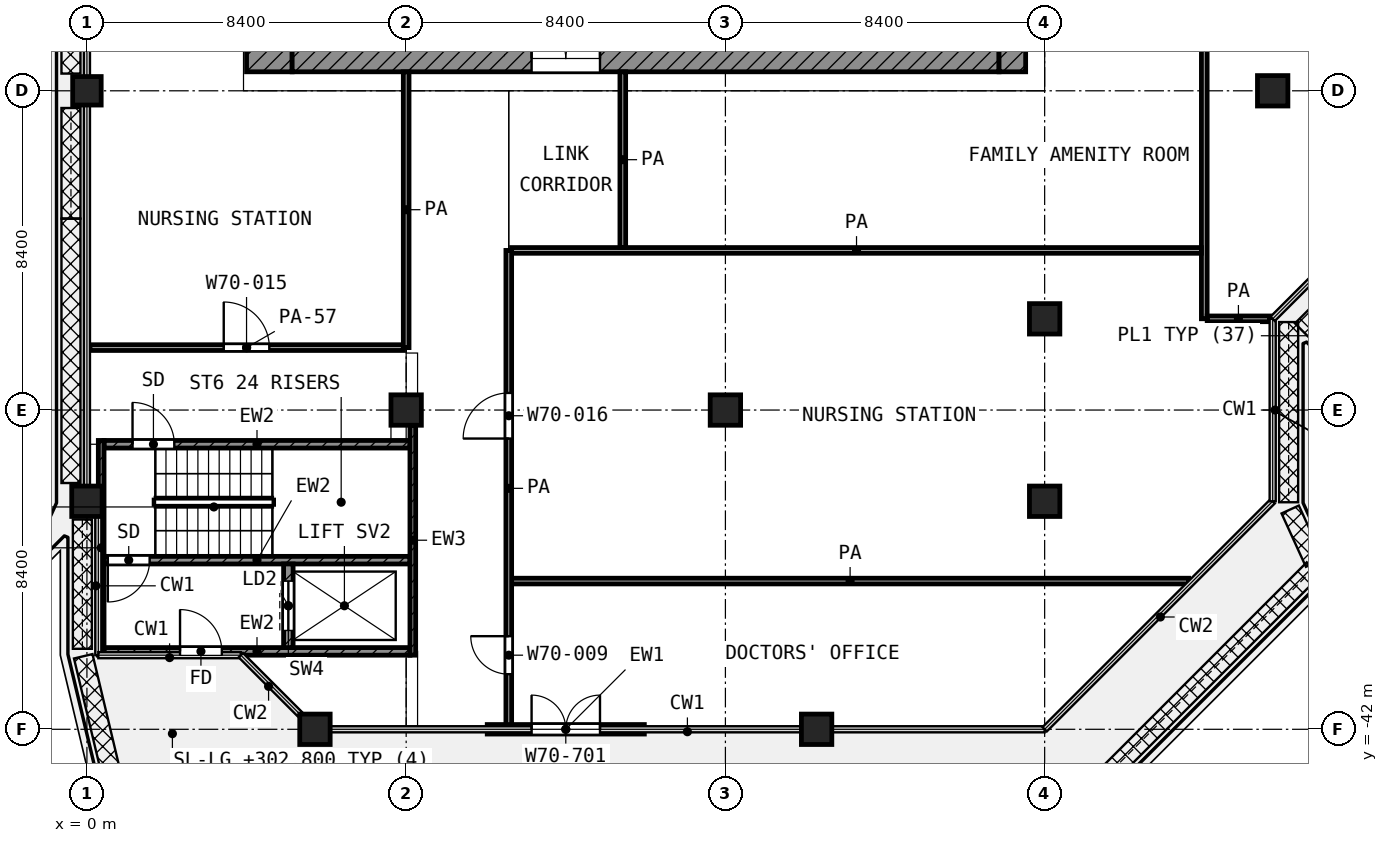
"""IFC4 building model, lengths in metres.
Left out: names, types, materials, properties, quantities, classifications, styles, units other than length and angle.
Written with IfcOpenShell. Run it as: python <this file> out.ifc"""

import sys

from ifc_helpers import new_model, si_unit, direction, frame, frame_2d, origin, origin_2d, place, context, subcontext, project, spatial, rectangle, extrude, element, fill, save


model = new_model("IFC4")
c1 = context("Model", 3, precision=1e-05, world=origin(), true_north=direction((0.0, 1.0)))
c2 = subcontext(c1, "Body", "Model", "MODEL_VIEW")
j1 = project(units=[si_unit("LENGTHUNIT", "METRE"), si_unit("PLANEANGLEUNIT", "RADIAN")], contexts=[c1])
p1 = place(None, origin())
s1 = spatial("IfcSite", under=j1, at=p1, CompositionType="ELEMENT")
p2 = place(p1, origin())
s2 = spatial("IfcBuilding", under=s1, at=p2, CompositionType="ELEMENT")
p3 = place(p2, frame((0.0, 0.0, 302.8)))
s3 = spatial("IfcBuildingStorey", under=s2, at=p3, CompositionType="ELEMENT", Elevation=302.8)
p4 = place(p3, frame((0.0, -25.2, 0.0), z_axis=(0.0, 0.0, 1.0), x_axis=(1.0, 0.0, 0.0)))
e1 = element("IfcColumn", 1, at=p4, inside=s3, PredefinedType="COLUMN", context=c2, shape_type="SweptSolid", body=[
    extrude(rectangle(XDim=0.75, YDim=0.75, at=origin_2d()), origin(), (0.0, 0.0, 1.0), 4.2),
])
for number, where, z_axis, x_axis in (
    (2, (31.2, -25.2, 0.0), (0.0, 0.0, 1.0), (1.0, 0.0, 0.0)),
    (3, (25.2, -31.2, 0.0), (0.0, 0.0, 1.0), (1.0, 0.0, 0.0)),
    (4, (8.4, -33.6, 0.0), (0.0, 0.0, 1.0), (1.0, 0.0, 0.0)),
    (5, (16.8, -33.6, 0.0), (0.0, 0.0, 1.0), (1.0, 0.0, 0.0)),
    (6, (0.0, -36.0, 0.0), (0.0, 0.0, 1.0), (1.0, 0.0, 0.0)),
    (7, (25.2, -36.0, 0.0), (0.0, 0.0, 1.0), (1.0, 0.0, 0.0)),
    (8, (6.0, -42.0, 0.0), (0.0, 0.0, 1.0), (1.0, 0.0, 0.0)),
    (9, (19.2, -42.0, 0.0), (0.0, 0.0, 1.0), (1.0, 0.0, 0.0)),
):
    element("IfcColumn", number, at=place(p3, frame(where, z_axis=z_axis, x_axis=x_axis)), inside=s3, PredefinedType="COLUMN", context=c2, shape_type="SweptSolid", body=[
        extrude(rectangle(XDim=0.8, YDim=0.8, at=origin_2d()), origin(), (0.0, 0.0, 1.0), 4.2),
    ])
p5 = place(p3, frame((10.533, -42.0, 0.0), z_axis=(0.0, 0.0, 1.0), x_axis=(1.0, 0.0, 0.0)))
e10 = element("IfcWall", 10, at=p5, inside=s3, PredefinedType="SOLIDWALL", context=c2, shape_type="SweptSolid", body=[
    extrude(rectangle(XDim=4.133, YDim=0.25, at=frame_2d((2.067, 0.0))), origin(), (0.0, 0.0, 1.0), 3.48),
])
p6 = place(p5, frame((1.167, 0.0, 0.0)))
e11 = element("IfcOpeningElement", 11, at=p6, cuts=e10, PredefinedType="OPENING", context=c2, shape_type="SweptSolid", body=[
    extrude(rectangle(XDim=1.8, YDim=2.1, at=frame_2d((0.9, 1.05))), frame((0.0, 0.135, 0.0), z_axis=(0.0, -1.0, 0.0), x_axis=(1.0, 0.0, 0.0)), (0.0, 0.0, 1.0), 0.27),
])
p7 = place(p3, frame((4.8, -24.7, 0.0), z_axis=(0.0, 0.0, 1.0), x_axis=(0.0, 1.0, 0.0)))
e12 = element("IfcWall", 12, at=p7, inside=s3, PredefinedType="SHEAR", context=c2, shape_type="SweptSolid", body=[
    extrude(rectangle(XDim=19.3, YDim=1.2, at=frame_2d((9.65, 0.0))), origin(), (0.0, 0.0, 1.0), 3.6),
])
p8 = place(p7, frame((11.15, 0.0, 0.0)))
e13 = element("IfcOpeningElement", 13, at=p8, cuts=e12, PredefinedType="OPENING", context=c2, shape_type="SweptSolid", body=[
    extrude(rectangle(XDim=1.1, YDim=2.1, at=frame_2d((0.55, 1.05))), frame((0.0, 0.61, 0.0), z_axis=(0.0, -1.0, 0.0), x_axis=(1.0, 0.0, 0.0)), (0.0, 0.0, 1.0), 1.22),
])
p9 = place(p7, frame((1.85, 0.0, 0.0)))
e14 = element("IfcOpeningElement", 14, at=p9, cuts=e12, PredefinedType="OPENING", context=c2, shape_type="SweptSolid", body=[
    extrude(rectangle(XDim=1.1, YDim=2.1, at=frame_2d((0.55, 1.05))), frame((0.0, 0.61, 0.0), z_axis=(0.0, -1.0, 0.0), x_axis=(1.0, 0.0, 0.0)), (0.0, 0.0, 1.0), 1.22),
])
p10 = place(p3, frame((5.4, -24.35, 0.0), z_axis=(0.0, 0.0, 1.0), x_axis=(1.0, 0.0, 0.0)))
e15 = element("IfcWall", 15, at=p10, inside=s3, PredefinedType="SHEAR", context=c2, shape_type="SweptSolid", body=[
    extrude(rectangle(XDim=18.6, YDim=0.7, at=frame_2d((9.3, 0.0))), origin(), (0.0, 0.0, 1.0), 3.6),
])
p11 = place(p10, frame((6.3, 0.0, 0.0)))
e16 = element("IfcOpeningElement", 16, at=p11, cuts=e15, PredefinedType="OPENING", context=c2, shape_type="SweptSolid", body=[
    extrude(rectangle(XDim=1.8, YDim=2.1, at=frame_2d((0.9, 1.05))), frame((0.0, 0.36, 0.0), z_axis=(0.0, -1.0, 0.0), x_axis=(1.0, 0.0, 0.0)), (0.0, 0.0, 1.0), 0.72),
])
p12 = place(p3, frame((24.35, -24.7, 0.0), z_axis=(0.0, 0.0, 1.0), x_axis=(0.0, 1.0, 0.0)))
e17 = element("IfcWall", 17, at=p12, inside=s3, PredefinedType="SHEAR", context=c2, shape_type="SweptSolid", body=[
    extrude(rectangle(XDim=0.7, YDim=0.7, at=frame_2d((0.35, 0.0))), origin(), (0.0, 0.0, 1.0), 3.6),
])
p13 = place(p3, frame((0.375, -40.05, 0.0), z_axis=(0.0, 0.0, 1.0), x_axis=(0.0, 1.0, 0.0)))
e18 = element("IfcWall", 18, at=p13, inside=s3, PredefinedType="SHEAR", context=c2, shape_type="SweptSolid", body=[
    extrude(rectangle(XDim=5.65, YDim=0.15, at=frame_2d((2.825, 0.0))), origin(), (0.0, 0.0, 1.0), 3.6),
])
p14 = place(p3, frame((8.575, -40.05, 0.0), z_axis=(0.0, 0.0, 1.0), x_axis=(0.0, 1.0, 0.0)))
e19 = element("IfcWall", 19, at=p14, inside=s3, PredefinedType="SHEAR", context=c2, shape_type="SweptSolid", body=[
    extrude(rectangle(XDim=6.05, YDim=0.15, at=frame_2d((3.025, 0.0))), origin(), (0.0, 0.0, 1.0), 3.6),
])
p15 = place(p3, frame((0.45, -34.5, 0.0), z_axis=(0.0, 0.0, 1.0), x_axis=(1.0, 0.0, 0.0)))
e20 = element("IfcWall", 20, at=p15, inside=s3, PredefinedType="SHEAR", context=c2, shape_type="SweptSolid", body=[
    extrude(rectangle(XDim=8.05, YDim=0.2, at=frame_2d((4.025, 0.0))), origin(), (0.0, 0.0, 1.0), 3.6),
])
p16 = place(p15, frame((0.75, 0.0, 0.0)))
e21 = element("IfcOpeningElement", 21, at=p16, cuts=e20, PredefinedType="OPENING", context=c2, shape_type="SweptSolid", body=[
    extrude(rectangle(XDim=1.1, YDim=2.1, at=frame_2d((0.55, 1.05))), frame((0.0, 0.11, 0.0), z_axis=(0.0, -1.0, 0.0), x_axis=(1.0, 0.0, 0.0)), (0.0, 0.0, 1.0), 0.22),
])
p17 = place(p3, frame((0.45, -37.55, 0.0), z_axis=(0.0, 0.0, 1.0), x_axis=(1.0, 0.0, 0.0)))
e22 = element("IfcWall", 22, at=p17, inside=s3, PredefinedType="SHEAR", context=c2, shape_type="SweptSolid", body=[
    extrude(rectangle(XDim=8.05, YDim=0.2, at=frame_2d((4.025, 0.0))), origin(), (0.0, 0.0, 1.0), 3.6),
])
p18 = place(p17, frame((0.1, 0.0, 0.0)))
e23 = element("IfcOpeningElement", 23, at=p18, cuts=e22, PredefinedType="OPENING", context=c2, shape_type="SweptSolid", body=[
    extrude(rectangle(XDim=1.1, YDim=2.1, at=frame_2d((0.55, 1.05))), frame((0.0, 0.11, 0.0), z_axis=(0.0, -1.0, 0.0), x_axis=(1.0, 0.0, 0.0)), (0.0, 0.0, 1.0), 0.22),
])
p19 = place(p3, frame((0.45, -39.95, 0.0), z_axis=(0.0, 0.0, 1.0), x_axis=(1.0, 0.0, 0.0)))
e24 = element("IfcWall", 24, at=p19, inside=s3, PredefinedType="SHEAR", context=c2, shape_type="SweptSolid", body=[
    extrude(rectangle(XDim=8.05, YDim=0.2, at=frame_2d((4.025, 0.0))), origin(), (0.0, 0.0, 1.0), 3.6),
])
p20 = place(p19, frame((2.0, 0.0, 0.0)))
e25 = element("IfcOpeningElement", 25, at=p20, cuts=e24, PredefinedType="OPENING", context=c2, shape_type="SweptSolid", body=[
    extrude(rectangle(XDim=1.1, YDim=2.1, at=frame_2d((0.55, 1.05))), frame((0.0, 0.11, 0.0), z_axis=(0.0, -1.0, 0.0), x_axis=(1.0, 0.0, 0.0)), (0.0, 0.0, 1.0), 0.22),
])
p21 = place(p3, frame((5.3, -39.85, 0.0), z_axis=(0.0, 0.0, 1.0), x_axis=(0.0, 1.0, 0.0)))
e26 = element("IfcWall", 26, at=p21, inside=s3, PredefinedType="SHEAR", context=c2, shape_type="SweptSolid", body=[
    extrude(rectangle(XDim=2.2, YDim=0.25, at=frame_2d((1.1, 0.0))), origin(), (0.0, 0.0, 1.0), 3.6),
])
p22 = place(p21, frame((0.45, 0.0, 0.0)))
e27 = element("IfcOpeningElement", 27, at=p22, cuts=e26, PredefinedType="OPENING", context=c2, shape_type="SweptSolid", body=[
    extrude(rectangle(XDim=1.3, YDim=2.1, at=frame_2d((0.65, 1.05))), frame((0.0, 0.135, 0.0), z_axis=(0.0, -1.0, 0.0), x_axis=(1.0, 0.0, 0.0)), (0.0, 0.0, 1.0), 0.27),
])
p23 = place(p3, frame((11.175, -38.1, 0.0), z_axis=(0.0, 0.0, 1.0), x_axis=(1.0, 0.0, 0.0)))
e28 = element("IfcWall", 28, at=p23, inside=s3, PredefinedType="PARTITIONING", context=c2, shape_type="SweptSolid", body=[
    extrude(rectangle(XDim=17.812, YDim=0.15, at=frame_2d((8.906, 0.0))), origin(), (0.0, 0.0, 1.0), 3.6),
])
p24 = place(p3, frame((0.08, -31.957, 0.0), z_axis=(0.0, 0.0, 1.0), x_axis=(1.0, 0.0, 0.0)))
e29 = element("IfcWall", 29, at=p24, inside=s3, PredefinedType="PARTITIONING", context=c2, shape_type="SweptSolid", body=[
    extrude(rectangle(XDim=8.245, YDim=0.15, at=frame_2d((4.123, 0.0))), origin(), (0.0, 0.0, 1.0), 2.7),
])
p25 = place(p24, frame((3.52, 0.0, 0.0)))
e30 = element("IfcOpeningElement", 30, at=p25, cuts=e29, PredefinedType="OPENING", context=c2, shape_type="SweptSolid", body=[
    extrude(rectangle(XDim=1.2, YDim=2.1, at=frame_2d((0.6, 1.05))), frame((0.0, 0.085, 0.0), z_axis=(0.0, -1.0, 0.0), x_axis=(1.0, 0.0, 0.0)), (0.0, 0.0, 1.0), 0.17),
])
p26 = place(p3, frame((29.477, -31.2, 0.0), z_axis=(0.0, 0.0, 1.0), x_axis=(1.0, 0.0, 0.0)))
e31 = element("IfcWall", 31, at=p26, inside=s3, PredefinedType="PARTITIONING", context=c2, shape_type="SweptSolid", body=[
    extrude(rectangle(XDim=1.643, YDim=0.15, at=frame_2d((0.822, 0.0))), origin(), (0.0, 0.0, 1.0), 3.6),
])
p27 = place(p3, frame((11.175, -29.4, 0.0), z_axis=(0.0, 0.0, 1.0), x_axis=(1.0, 0.0, 0.0)))
e32 = element("IfcWall", 32, at=p27, inside=s3, PredefinedType="PARTITIONING", context=c2, shape_type="SweptSolid", body=[
    extrude(rectangle(XDim=18.15, YDim=0.15, at=frame_2d((9.075, 0.0))), origin(), (0.0, 0.0, 1.0), 3.6),
])
p28 = place(p3, frame((8.4, -31.957, 0.0), z_axis=(0.0, 0.0, 1.0), x_axis=(0.0, 1.0, 0.0)))
e33 = element("IfcWall", 33, at=p28, inside=s3, PredefinedType="PARTITIONING", context=c2, shape_type="SweptSolid", body=[
    extrude(rectangle(XDim=7.257, YDim=0.15, at=frame_2d((3.628, 0.0))), origin(), (0.0, 0.0, 1.0), 3.6),
])
p29 = place(p3, frame((11.1, -41.92, 0.0), z_axis=(0.0, 0.0, 1.0), x_axis=(0.0, 1.0, 0.0)))
e34 = element("IfcWall", 34, at=p29, inside=s3, PredefinedType="PARTITIONING", context=c2, shape_type="SweptSolid", body=[
    extrude(rectangle(XDim=12.52, YDim=0.15, at=frame_2d((6.26, 0.0))), origin(), (0.0, 0.0, 1.0), 3.6),
])
p30 = place(p29, frame((7.57, 0.0, 0.0)))
e35 = element("IfcOpeningElement", 35, at=p30, cuts=e34, PredefinedType="OPENING", context=c2, shape_type="SweptSolid", body=[
    extrude(rectangle(XDim=1.2, YDim=2.1, at=frame_2d((0.6, 1.05))), frame((0.0, 0.085, 0.0), z_axis=(0.0, -1.0, 0.0), x_axis=(1.0, 0.0, 0.0)), (0.0, 0.0, 1.0), 0.17),
])
p31 = place(p29, frame((1.37, 0.0, 0.0)))
e36 = element("IfcOpeningElement", 36, at=p31, cuts=e34, PredefinedType="OPENING", context=c2, shape_type="SweptSolid", body=[
    extrude(rectangle(XDim=1.0, YDim=2.1, at=frame_2d((0.5, 1.05))), frame((0.0, 0.085, 0.0), z_axis=(0.0, -1.0, 0.0), x_axis=(1.0, 0.0, 0.0)), (0.0, 0.0, 1.0), 0.17),
])
p32 = place(p3, frame((14.1, -29.325, 0.0), z_axis=(0.0, 0.0, 1.0), x_axis=(0.0, 1.0, 0.0)))
e37 = element("IfcWall", 37, at=p32, inside=s3, PredefinedType="PARTITIONING", context=c2, shape_type="SweptSolid", body=[
    extrude(rectangle(XDim=4.625, YDim=0.15, at=frame_2d((2.312, 0.0))), origin(), (0.0, 0.0, 1.0), 3.6),
])
p33 = place(p3, frame((29.4, -31.198, 0.0), z_axis=(0.0, 0.0, 1.0), x_axis=(0.0, 1.0, 0.0)))
e38 = element("IfcWall", 38, at=p33, inside=s3, PredefinedType="PARTITIONING", context=c2, shape_type="SweptSolid", body=[
    extrude(rectangle(XDim=20.098, YDim=0.15, at=frame_2d((10.049, 0.0))), origin(), (0.0, 0.0, 1.0), 3.6),
])
p34 = place(p6, origin())
e39 = element("IfcDoor", 39, at=p34, inside=s3, OperationType="DOUBLE_DOOR_SINGLE_SWING", PredefinedType="DOOR", context=c2, shape_type="SweptSolid", body=[
    extrude(rectangle(XDim=1.8, YDim=2.1, at=frame_2d((0.9, 1.05))), frame((0.0, 0.025, 0.0), z_axis=(0.0, -1.0, 0.0), x_axis=(1.0, 0.0, 0.0)), (0.0, 0.0, 1.0), 0.05),
])
fill(e11, e39)
p35 = place(p11, origin())
e40 = element("IfcDoor", 40, at=p35, inside=s3, OperationType="DOUBLE_DOOR_SINGLE_SWING", PredefinedType="DOOR", context=c2, shape_type="SweptSolid", body=[
    extrude(rectangle(XDim=1.8, YDim=2.1, at=frame_2d((0.9, 1.05))), frame((0.0, 0.025, 0.0), z_axis=(0.0, -1.0, 0.0), x_axis=(1.0, 0.0, 0.0)), (0.0, 0.0, 1.0), 0.05),
])
fill(e16, e40)
p36 = place(p16, origin())
e41 = element("IfcDoor", 41, at=p36, inside=s3, OperationType="SINGLE_SWING_LEFT", PredefinedType="DOOR", context=c2, shape_type="SweptSolid", body=[
    extrude(rectangle(XDim=1.1, YDim=2.1, at=frame_2d((0.55, 1.05))), frame((0.0, 0.025, 0.0), z_axis=(0.0, -1.0, 0.0), x_axis=(1.0, 0.0, 0.0)), (0.0, 0.0, 1.0), 0.05),
])
fill(e21, e41)
p37 = place(p18, frame((1.1, 0.0, 0.0), z_axis=(0.0, 0.0, 1.0), x_axis=(-1.0, 0.0, 0.0)))
e42 = element("IfcDoor", 42, at=p37, inside=s3, OperationType="SINGLE_SWING_LEFT", PredefinedType="DOOR", context=c2, shape_type="SweptSolid", body=[
    extrude(rectangle(XDim=1.1, YDim=2.1, at=frame_2d((0.55, 1.05))), frame((0.0, 0.025, 0.0), z_axis=(0.0, -1.0, 0.0), x_axis=(1.0, 0.0, 0.0)), (0.0, 0.0, 1.0), 0.05),
])
fill(e23, e42)
p38 = place(p22, origin())
e43 = element("IfcDoor", 43, at=p38, inside=s3, OperationType="DOUBLE_DOOR_SLIDING", PredefinedType="DOOR", context=c2, shape_type="SweptSolid", body=[
    extrude(rectangle(XDim=1.3, YDim=2.1, at=frame_2d((0.65, 1.05))), frame((0.0, 0.025, 0.0), z_axis=(0.0, -1.0, 0.0), x_axis=(1.0, 0.0, 0.0)), (0.0, 0.0, 1.0), 0.05),
])
fill(e27, e43)
p39 = place(p20, origin())
e44 = element("IfcDoor", 44, at=p39, inside=s3, OperationType="SINGLE_SWING_LEFT", PredefinedType="DOOR", context=c2, shape_type="SweptSolid", body=[
    extrude(rectangle(XDim=1.1, YDim=2.1, at=frame_2d((0.55, 1.05))), frame((0.0, 0.025, 0.0), z_axis=(0.0, -1.0, 0.0), x_axis=(1.0, 0.0, 0.0)), (0.0, 0.0, 1.0), 0.05),
])
fill(e25, e44)
p40 = place(p25, origin())
e45 = element("IfcDoor", 45, at=p40, inside=s3, OperationType="SINGLE_SWING_LEFT", PredefinedType="DOOR", context=c2, shape_type="SweptSolid", body=[
    extrude(rectangle(XDim=1.2, YDim=2.1, at=frame_2d((0.6, 1.05))), frame((0.0, 0.025, 0.0), z_axis=(0.0, -1.0, 0.0), x_axis=(1.0, 0.0, 0.0)), (0.0, 0.0, 1.0), 0.05),
])
fill(e30, e45)
p41 = place(p30, origin())
e46 = element("IfcDoor", 46, at=p41, inside=s3, OperationType="SINGLE_SWING_LEFT", PredefinedType="DOOR", context=c2, shape_type="SweptSolid", body=[
    extrude(rectangle(XDim=1.2, YDim=2.1, at=frame_2d((0.6, 1.05))), frame((0.0, 0.025, 0.0), z_axis=(0.0, -1.0, 0.0), x_axis=(1.0, 0.0, 0.0)), (0.0, 0.0, 1.0), 0.05),
])
fill(e35, e46)
p42 = place(p31, origin())
e47 = element("IfcDoor", 47, at=p42, inside=s3, OperationType="SINGLE_SWING_RIGHT", PredefinedType="DOOR", context=c2, shape_type="SweptSolid", body=[
    extrude(rectangle(XDim=1.0, YDim=2.1, at=frame_2d((0.5, 1.05))), frame((0.0, 0.025, 0.0), z_axis=(0.0, -1.0, 0.0), x_axis=(1.0, 0.0, 0.0)), (0.0, 0.0, 1.0), 0.05),
])
fill(e36, e47)
save(model, sys.argv[1])
